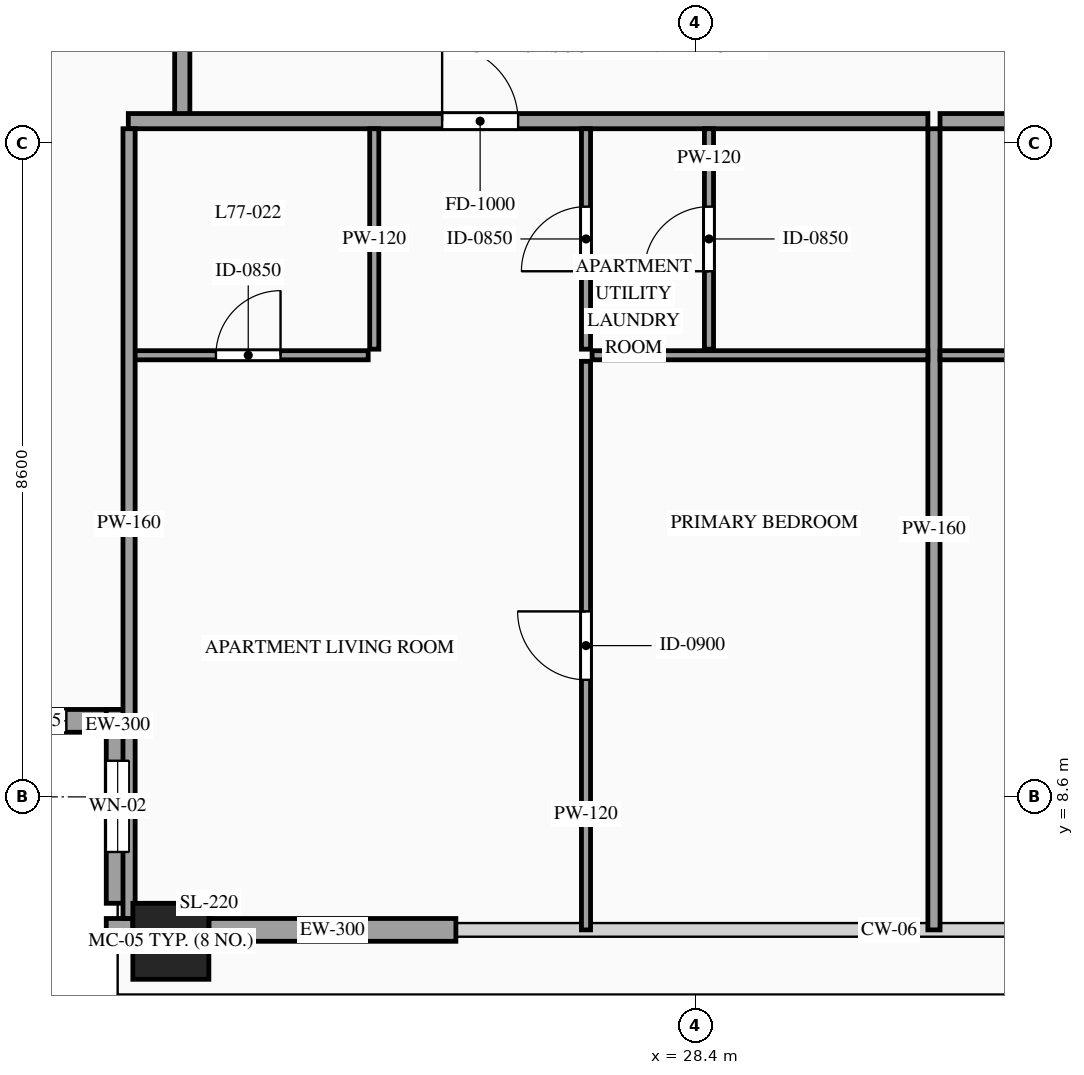
"""IFC4 building model, lengths in metres.
Left out: names, types, materials, properties, quantities, classifications, styles, units other than length and angle.
Written with IfcOpenShell. Run it as: python <this file> out.ifc"""

import sys

from ifc_helpers import new_model, si_unit, direction, frame, frame_2d, origin, origin_2d, place, context, subcontext, project, spatial, rectangle, hollow_rectangle, extrude, source, transform, mapped, element, fill, save


model = new_model("IFC4")
c1 = context("Model", 3, precision=1e-05, world=origin(), true_north=direction((0.0, 1.0)))
c2 = subcontext(c1, "Body", "Model", "MODEL_VIEW")
j1 = project(units=[si_unit("LENGTHUNIT", "METRE"), si_unit("PLANEANGLEUNIT", "RADIAN")], contexts=[c1])
p1 = place(None, origin())
s1 = spatial("IfcSite", under=j1, at=p1, CompositionType="ELEMENT")
p2 = place(p1, origin())
s2 = spatial("IfcBuilding", under=s1, at=p2, CompositionType="ELEMENT")
p3 = place(p2, frame((0.0, 0.0, 289.1)))
s3 = spatial("IfcBuildingStorey", under=s2, at=p3, CompositionType="ELEMENT", Elevation=289.1)
m1 = source(origin(), c2, "Body", "SweptSolid", [
    extrude(hollow_rectangle(XDim=1.0, YDim=1.0, WallThickness=0.048, at=origin_2d()), origin(), (0.0, 0.0, 1.0), 3.5),
])
p4 = place(p3, frame((21.5, 6.7, 0.0), z_axis=(0.0, 0.0, 1.0), x_axis=(1.0, 0.0, 0.0)))
e1 = element("IfcColumn", 1, at=p4, inside=s3, PredefinedType="COLUMN", context=c2, shape_type="MappedRepresentation", body=[
    mapped(m1, transform((0.0, 0.0, 0.0), scale=1.0)),
])
p5 = place(p3, frame((18.4, 9.6, 0.0), z_axis=(0.0, 0.0, 1.0), x_axis=(1.0, 0.0, 0.0)))
e2 = element("IfcWall", 2, at=p5, inside=s3, PredefinedType="SOLIDWALL", context=c2, shape_type="SweptSolid", body=[
    extrude(rectangle(XDim=2.55, YDim=0.3, at=frame_2d((1.275, 0.0))), origin(), (0.0, 0.0, 1.0), 3.28),
])
p6 = place(p5, frame((0.825, 0.0, 0.85)))
e3 = element("IfcOpeningElement", 3, at=p6, cuts=e2, PredefinedType="OPENING", context=c2, shape_type="SweptSolid", body=[
    extrude(rectangle(XDim=0.9, YDim=1.5, at=frame_2d((0.45, 0.75))), frame((0.0, 0.165, 0.0), z_axis=(0.0, -1.0, 0.0), x_axis=(1.0, 0.0, 0.0)), (0.0, 0.0, 1.0), 0.33),
])
p7 = place(p3, frame((20.8, 9.75, 0.0), z_axis=(0.0, 0.0, 1.0), x_axis=(0.0, -1.0, 0.0)))
e4 = element("IfcWall", 4, at=p7, inside=s3, PredefinedType="SOLIDWALL", context=c2, shape_type="SweptSolid", body=[
    extrude(rectangle(XDim=2.55, YDim=0.3, at=frame_2d((1.275, 0.0))), origin(), (0.0, 0.0, 1.0), 3.28),
])
p8 = place(p7, frame((0.675, 0.0, 0.85)))
e5 = element("IfcOpeningElement", 5, at=p8, cuts=e4, PredefinedType="OPENING", context=c2, shape_type="SweptSolid", body=[
    extrude(rectangle(XDim=1.2, YDim=2.1, at=frame_2d((0.6, 1.05))), frame((0.0, 0.165, 0.0), z_axis=(0.0, -1.0, 0.0), x_axis=(1.0, 0.0, 0.0)), (0.0, 0.0, 1.0), 0.33),
])
m2 = source(origin(), c2, "Body", "SweptSolid", [
    extrude(rectangle(XDim=0.35, YDim=0.3, at=frame_2d((0.175, 0.0))), origin(), (0.0, 0.0, 1.0), 3.28),
])
p9 = place(p3, frame((20.65, 6.85, 0.0), z_axis=(0.0, 0.0, 1.0), x_axis=(1.0, 0.0, 0.0)))
e6 = element("IfcWall", 6, at=p9, inside=s3, PredefinedType="SOLIDWALL", context=c2, shape_type="MappedRepresentation", body=[
    mapped(m2, transform((0.0, 0.0, 0.0), scale=1.0)),
])
m3 = source(origin(), c2, "Body", "SweptSolid", [
    extrude(rectangle(XDim=3.25, YDim=0.3, at=frame_2d((1.625, 0.0))), origin(), (0.0, 0.0, 1.0), 2.885),
])
p10 = place(p3, frame((22.0, 6.85, 0.0), z_axis=(0.0, 0.0, 1.0), x_axis=(1.0, 0.0, 0.0)))
e7 = element("IfcWall", 7, at=p10, inside=s3, PredefinedType="SOLIDWALL", context=c2, shape_type="MappedRepresentation", body=[
    mapped(m3, transform((0.0, 0.0, 0.0), scale=1.0)),
])
m4 = source(origin(), c2, "Body", "SweptSolid", [
    extrude(rectangle(XDim=1.7, YDim=0.2, at=frame_2d((0.85, 0.0))), origin(), (0.0, 0.0, 1.0), 3.28),
])
p11 = place(p3, frame((21.65, 17.55, 0.0), z_axis=(0.0, 0.0, 1.0), x_axis=(0.0, 1.0, 0.0)))
e8 = element("IfcWall", 8, at=p11, inside=s3, PredefinedType="PARTITIONING", context=c2, shape_type="MappedRepresentation", body=[
    mapped(m4, transform((0.0, 0.0, 0.0), scale=1.0)),
])
p12 = place(p3, frame((20.94, 17.49, 0.0), z_axis=(0.0, 0.0, 1.0), x_axis=(1.0, 0.0, 0.0)))
e9 = element("IfcWall", 9, at=p12, inside=s3, PredefinedType="PARTITIONING", context=c2, shape_type="SweptSolid", body=[
    extrude(rectangle(XDim=10.52, YDim=0.2, at=frame_2d((5.26, 0.0))), origin(), (0.0, 0.0, 1.0), 3.28),
])
p13 = place(p12, frame((4.129, 0.0, 0.0)))
e10 = element("IfcOpeningElement", 10, at=p13, cuts=e9, PredefinedType="OPENING", context=c2, shape_type="SweptSolid", body=[
    extrude(rectangle(XDim=1.0, YDim=2.2, at=frame_2d((0.5, 1.1))), frame((0.0, 0.115, 0.0), z_axis=(0.0, -1.0, 0.0), x_axis=(1.0, 0.0, 0.0)), (0.0, 0.0, 1.0), 0.23),
])
m5 = source(origin(), c2, "Body", "SweptSolid", [
    extrude(rectangle(XDim=10.54, YDim=0.16, at=frame_2d((5.27, 0.0))), origin(), (0.0, 0.0, 1.0), 3.28),
])
p14 = place(p3, frame((31.54, 6.85, 0.0), z_axis=(0.0, 0.0, 1.0), x_axis=(0.0, 1.0, 0.0)))
e11 = element("IfcWall", 11, at=p14, inside=s3, PredefinedType="PARTITIONING", context=c2, shape_type="MappedRepresentation", body=[
    mapped(m5, transform((0.0, 0.0, 0.0), scale=1.0)),
])
p15 = place(p3, frame((20.94, 14.41, 0.0), z_axis=(0.0, 0.0, 1.0), x_axis=(1.0, 0.0, 0.0)))
e12 = element("IfcWall", 12, at=p15, inside=s3, PredefinedType="PARTITIONING", context=c2, shape_type="SweptSolid", body=[
    extrude(rectangle(XDim=3.156, YDim=0.12, at=frame_2d((1.578, 0.0))), origin(), (0.0, 0.0, 1.0), 3.28),
])
p16 = place(p15, frame((1.153, 0.0, 0.0)))
e13 = element("IfcOpeningElement", 13, at=p16, cuts=e12, PredefinedType="OPENING", context=c2, shape_type="SweptSolid", body=[
    extrude(rectangle(XDim=0.85, YDim=2.1, at=frame_2d((0.425, 1.05))), frame((0.0, 0.075, 0.0), z_axis=(0.0, -1.0, 0.0), x_axis=(1.0, 0.0, 0.0)), (0.0, 0.0, 1.0), 0.15),
])
m6 = source(origin(), c2, "Body", "SweptSolid", [
    extrude(rectangle(XDim=2.9, YDim=0.12, at=frame_2d((1.45, 0.0))), origin(), (0.0, 0.0, 1.0), 3.28),
])
p17 = place(p3, frame((24.176, 14.49, 0.0), z_axis=(0.0, 0.0, 1.0), x_axis=(0.0, 1.0, 0.0)))
e14 = element("IfcWall", 14, at=p17, inside=s3, PredefinedType="PARTITIONING", context=c2, shape_type="MappedRepresentation", body=[
    mapped(m6, transform((0.0, 0.0, 0.0), scale=1.0)),
])
p18 = place(p3, frame((28.58, 14.49, 0.0), z_axis=(0.0, 0.0, 1.0), x_axis=(0.0, 1.0, 0.0)))
e15 = element("IfcWall", 15, at=p18, inside=s3, PredefinedType="PARTITIONING", context=c2, shape_type="SweptSolid", body=[
    extrude(rectangle(XDim=2.9, YDim=0.12, at=frame_2d((1.45, 0.0))), origin(), (0.0, 0.0, 1.0), 3.28),
])
p19 = place(p18, frame((1.025, 0.0, 0.0)))
e16 = element("IfcOpeningElement", 16, at=p19, cuts=e15, PredefinedType="OPENING", context=c2, shape_type="SweptSolid", body=[
    extrude(rectangle(XDim=0.85, YDim=2.1, at=frame_2d((0.425, 1.05))), frame((0.0, 0.075, 0.0), z_axis=(0.0, -1.0, 0.0), x_axis=(1.0, 0.0, 0.0)), (0.0, 0.0, 1.0), 0.15),
])
m7 = source(origin(), c2, "Body", "SweptSolid", [
    extrude(rectangle(XDim=4.418, YDim=0.12, at=frame_2d((2.209, 0.0))), origin(), (0.0, 0.0, 1.0), 3.28),
])
p20 = place(p3, frame((27.042, 14.41, 0.0), z_axis=(0.0, 0.0, 1.0), x_axis=(1.0, 0.0, 0.0)))
e17 = element("IfcWall", 17, at=p20, inside=s3, PredefinedType="PARTITIONING", context=c2, shape_type="MappedRepresentation", body=[
    mapped(m7, transform((0.0, 0.0, 0.0), scale=1.0)),
])
p21 = place(p3, frame((26.962, 6.85, 0.0), z_axis=(0.0, 0.0, 1.0), x_axis=(0.0, 1.0, 0.0)))
e18 = element("IfcWall", 18, at=p21, inside=s3, PredefinedType="PARTITIONING", context=c2, shape_type="SweptSolid", body=[
    extrude(rectangle(XDim=7.48, YDim=0.12, at=frame_2d((3.74, 0.0))), origin(), (0.0, 0.0, 1.0), 3.28),
])
p22 = place(p21, frame((3.29, 0.0, 0.0)))
e19 = element("IfcOpeningElement", 19, at=p22, cuts=e18, PredefinedType="OPENING", context=c2, shape_type="SweptSolid", body=[
    extrude(rectangle(XDim=0.9, YDim=2.15, at=frame_2d((0.45, 1.075))), frame((0.0, 0.075, 0.0), z_axis=(0.0, -1.0, 0.0), x_axis=(1.0, 0.0, 0.0)), (0.0, 0.0, 1.0), 0.15),
])
p23 = place(p3, frame((26.962, 14.49, 0.0), z_axis=(0.0, 0.0, 1.0), x_axis=(0.0, 1.0, 0.0)))
e20 = element("IfcWall", 20, at=p23, inside=s3, PredefinedType="PARTITIONING", context=c2, shape_type="SweptSolid", body=[
    extrude(rectangle(XDim=2.9, YDim=0.12, at=frame_2d((1.45, 0.0))), origin(), (0.0, 0.0, 1.0), 3.28),
])
p24 = place(p23, frame((1.025, 0.0, 0.0)))
e21 = element("IfcOpeningElement", 21, at=p24, cuts=e20, PredefinedType="OPENING", context=c2, shape_type="SweptSolid", body=[
    extrude(rectangle(XDim=0.85, YDim=2.1, at=frame_2d((0.425, 1.05))), frame((0.0, 0.075, 0.0), z_axis=(0.0, -1.0, 0.0), x_axis=(1.0, 0.0, 0.0)), (0.0, 0.0, 1.0), 0.15),
])
p25 = place(p3, frame((31.62, 17.49, 0.0), z_axis=(0.0, 0.0, 1.0), x_axis=(1.0, 0.0, 0.0)))
e22 = element("IfcWall", 22, at=p25, inside=s3, PredefinedType="PARTITIONING", context=c2, shape_type="SweptSolid", body=[
    extrude(rectangle(XDim=10.76, YDim=0.2, at=frame_2d((5.38, 0.0))), origin(), (0.0, 0.0, 1.0), 3.28),
])
p26 = place(p25, frame((4.235, 0.0, 0.0)))
e23 = element("IfcOpeningElement", 23, at=p26, cuts=e22, PredefinedType="OPENING", context=c2, shape_type="SweptSolid", body=[
    extrude(rectangle(XDim=1.0, YDim=2.2, at=frame_2d((0.5, 1.1))), frame((0.0, 0.115, 0.0), z_axis=(0.0, -1.0, 0.0), x_axis=(1.0, 0.0, 0.0)), (0.0, 0.0, 1.0), 0.23),
])
p27 = place(p3, frame((31.62, 14.41, 0.0), z_axis=(0.0, 0.0, 1.0), x_axis=(1.0, 0.0, 0.0)))
e24 = element("IfcWall", 24, at=p27, inside=s3, PredefinedType="PARTITIONING", context=c2, shape_type="SweptSolid", body=[
    extrude(rectangle(XDim=3.228, YDim=0.12, at=frame_2d((1.614, 0.0))), origin(), (0.0, 0.0, 1.0), 3.28),
])
p28 = place(p27, frame((1.189, 0.0, 0.0)))
e25 = element("IfcOpeningElement", 25, at=p28, cuts=e24, PredefinedType="OPENING", context=c2, shape_type="SweptSolid", body=[
    extrude(rectangle(XDim=0.85, YDim=2.1, at=frame_2d((0.425, 1.05))), frame((0.0, 0.075, 0.0), z_axis=(0.0, -1.0, 0.0), x_axis=(1.0, 0.0, 0.0)), (0.0, 0.0, 1.0), 0.15),
])
m8 = source(origin(), c2, "Body", "SweptSolid", [
    extrude(rectangle(XDim=10.39, YDim=0.16, at=frame_2d((5.195, 0.0))), origin(), (0.0, 0.0, 1.0), 3.28),
])
p29 = place(p3, frame((20.95, 7.0, 0.0), z_axis=(0.0, 0.0, 1.0), x_axis=(0.0, 1.0, 0.0)))
e26 = element("IfcWall", 26, at=p29, inside=s3, PredefinedType="PARTITIONING", context=c2, shape_type="MappedRepresentation", body=[
    mapped(m8, transform((0.0, 0.0, 0.0), scale=1.0)),
])
m9 = source(origin(), c2, "Body", "SweptSolid", [
    extrude(rectangle(XDim=0.9, YDim=1.5, at=frame_2d((0.45, 0.75))), frame((0.0, 0.03, 0.0), z_axis=(0.0, -1.0, 0.0), x_axis=(1.0, 0.0, 0.0)), (0.0, 0.0, 1.0), 0.06),
])
p30 = place(p6, origin())
e27 = element("IfcWindow", 27, at=p30, inside=s3, PartitioningType="SINGLE_PANEL", PredefinedType="WINDOW", context=c2, shape_type="MappedRepresentation", body=[
    mapped(m9, transform((0.0, 0.0, 0.0), scale=1.0)),
])
fill(e3, e27)
m10 = source(origin(), c2, "Body", "SweptSolid", [
    extrude(rectangle(XDim=1.2, YDim=2.1, at=frame_2d((0.6, 1.05))), frame((0.0, 0.03, 0.0), z_axis=(0.0, -1.0, 0.0), x_axis=(1.0, 0.0, 0.0)), (0.0, 0.0, 1.0), 0.06),
])
p31 = place(p8, origin())
e28 = element("IfcWindow", 28, at=p31, inside=s3, PartitioningType="SINGLE_PANEL", PredefinedType="WINDOW", context=c2, shape_type="MappedRepresentation", body=[
    mapped(m10, transform((0.0, 0.0, 0.0), scale=1.0)),
])
fill(e5, e28)
m11 = source(origin(), c2, "Body", "SweptSolid", [
    extrude(rectangle(XDim=1.0, YDim=2.2, at=frame_2d((0.5, 1.1))), frame((0.0, 0.025, 0.0), z_axis=(0.0, -1.0, 0.0), x_axis=(1.0, 0.0, 0.0)), (0.0, 0.0, 1.0), 0.05),
])
p32 = place(p13, origin())
e29 = element("IfcDoor", 29, at=p32, inside=s3, OperationType="SINGLE_SWING_LEFT", PredefinedType="DOOR", context=c2, shape_type="MappedRepresentation", body=[
    mapped(m11, transform((0.0, 0.0, 0.0), scale=1.0)),
])
fill(e10, e29)
m12 = source(origin(), c2, "Body", "SweptSolid", [
    extrude(rectangle(XDim=0.85, YDim=2.1, at=frame_2d((0.425, 1.05))), frame((0.0, 0.025, 0.0), z_axis=(0.0, -1.0, 0.0), x_axis=(1.0, 0.0, 0.0)), (0.0, 0.0, 1.0), 0.05),
])
p33 = place(p16, origin())
e30 = element("IfcDoor", 30, at=p33, inside=s3, OperationType="SINGLE_SWING_RIGHT", PredefinedType="DOOR", context=c2, shape_type="MappedRepresentation", body=[
    mapped(m12, transform((0.0, 0.0, 0.0), scale=1.0)),
])
fill(e13, e30)
p34 = place(p19, origin())
e31 = element("IfcDoor", 31, at=p34, inside=s3, OperationType="SINGLE_SWING_LEFT", PredefinedType="DOOR", context=c2, shape_type="MappedRepresentation", body=[
    mapped(m12, transform((0.0, 0.0, 0.0), scale=1.0)),
])
fill(e16, e31)
m13 = source(origin(), c2, "Body", "SweptSolid", [
    extrude(rectangle(XDim=0.9, YDim=2.15, at=frame_2d((0.45, 1.075))), frame((0.0, 0.025, 0.0), z_axis=(0.0, -1.0, 0.0), x_axis=(1.0, 0.0, 0.0)), (0.0, 0.0, 1.0), 0.05),
])
p35 = place(p22, origin())
e32 = element("IfcDoor", 32, at=p35, inside=s3, OperationType="SINGLE_SWING_RIGHT", PredefinedType="DOOR", context=c2, shape_type="MappedRepresentation", body=[
    mapped(m13, transform((0.0, 0.0, 0.0), scale=1.0)),
])
fill(e19, e32)
p36 = place(p24, origin())
e33 = element("IfcDoor", 33, at=p36, inside=s3, OperationType="SINGLE_SWING_LEFT", PredefinedType="DOOR", context=c2, shape_type="MappedRepresentation", body=[
    mapped(m12, transform((0.0, 0.0, 0.0), scale=1.0)),
])
fill(e21, e33)
save(model, sys.argv[1])
